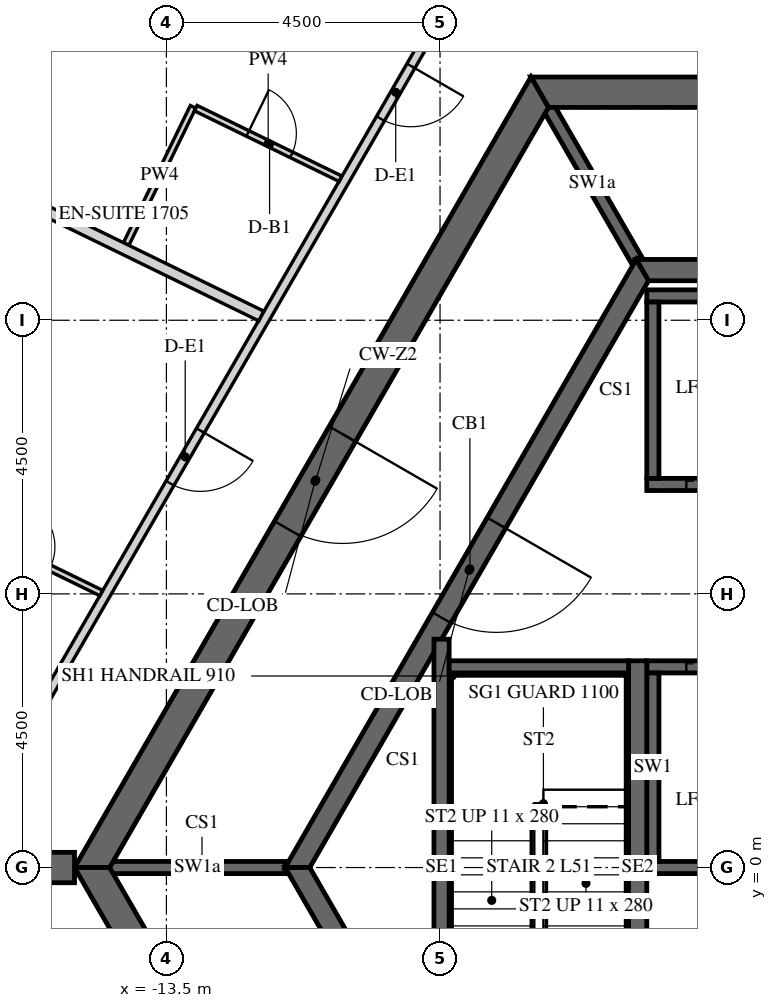
"""IFC4 building model, lengths in metres.
Left out: names, types, materials, properties, quantities, classifications, styles, units other than length and angle.
Written with IfcOpenShell. Run it as: python <this file> out.ifc"""

import sys

from ifc_helpers import new_model, si_unit, direction, frame, frame_2d, origin, place, context, subcontext, project, spatial, polyline, rectangle, outline, extrude, element, fill, save


model = new_model("IFC4")
c1 = context("Model", 3, precision=1e-05, world=origin(), true_north=direction((0.0, 1.0)))
c2 = subcontext(c1, "Body", "Model", "MODEL_VIEW")
j1 = project(units=[si_unit("LENGTHUNIT", "METRE"), si_unit("PLANEANGLEUNIT", "RADIAN")], contexts=[c1])
p1 = place(None, origin())
s1 = spatial("IfcSite", under=j1, at=p1, CompositionType="ELEMENT")
p2 = place(p1, origin())
s2 = spatial("IfcBuilding", under=s1, at=p2, CompositionType="ELEMENT")
p3 = place(p2, frame((0.0, 0.0, 215.1)))
s3 = spatial("IfcBuildingStorey", under=s2, at=p3, CompositionType="ELEMENT", Elevation=215.1)
p4 = place(p3, frame((-7.361, 12.75, -0.15), z_axis=(0.0, 0.0, 1.0), x_axis=(-0.50000571537, -0.866022103989, 0.0)))
e1 = element("IfcWall", 1, at=p4, inside=s3, PredefinedType="SHEAR", context=c2, shape_type="SweptSolid", body=[
    extrude(outline(polyline([(-0.144, -0.25), (14.867, -0.25), (14.578, 0.25), (0.144, 0.25), (-0.144, -0.25)])), origin(), (0.0, 0.0, 1.0), 3.9),
])
p5 = place(p4, frame((6.49, 0.0, 0.15)))
e2 = element("IfcOpeningElement", 2, at=p5, cuts=e1, PredefinedType="OPENING", context=c2, shape_type="SweptSolid", body=[
    extrude(rectangle(XDim=1.8, YDim=2.4, at=frame_2d((0.9, 1.2))), frame((0.0, 0.26, 0.0), z_axis=(0.0, -1.0, 0.0), x_axis=(1.0, 0.0, 0.0)), (0.0, 0.0, 1.0), 0.52),
])
p6 = place(p3, frame((-14.722, 0.0, -0.15), z_axis=(0.0, 0.0, 1.0), x_axis=(0.50000571537, -0.866022103989, 0.0)))
e3 = element("IfcWall", 3, at=p6, inside=s3, PredefinedType="SHEAR", context=c2, shape_type="SweptSolid", body=[
    extrude(outline(polyline([(-0.144, -0.25), (14.867, -0.25), (14.578, 0.25), (0.144, 0.25), (-0.144, -0.25)])), origin(), (0.0, 0.0, 1.0), 3.9),
])
p7 = place(p6, frame((6.432, 0.0, 0.15)))
e4 = element("IfcOpeningElement", 4, at=p7, cuts=e3, PredefinedType="OPENING", context=c2, shape_type="SweptSolid", body=[
    extrude(rectangle(XDim=1.8, YDim=2.4, at=frame_2d((0.9, 1.2))), frame((0.0, 0.26, 0.0), z_axis=(0.0, -1.0, 0.0), x_axis=(1.0, 0.0, 0.0)), (0.0, 0.0, 1.0), 0.52),
])
p8 = place(p3, frame((7.361, 12.75, -0.15), z_axis=(0.0, 0.0, 1.0), x_axis=(-1.0, 0.0, 0.0)))
e5 = element("IfcWall", 5, at=p8, inside=s3, PredefinedType="SHEAR", context=c2, shape_type="SweptSolid", body=[
    extrude(outline(polyline([(-0.144, -0.25), (14.866, -0.25), (14.578, 0.25), (0.144, 0.25), (-0.144, -0.25)])), origin(), (0.0, 0.0, 1.0), 3.9),
])
p9 = place(p8, frame((6.761, 0.0, 0.15)))
e6 = element("IfcOpeningElement", 6, at=p9, cuts=e5, PredefinedType="OPENING", context=c2, shape_type="SweptSolid", body=[
    extrude(rectangle(XDim=1.2, YDim=2.4, at=frame_2d((0.6, 1.2))), frame((0.0, 0.26, 0.0), z_axis=(0.0, -1.0, 0.0), x_axis=(1.0, 0.0, 0.0)), (0.0, 0.0, 1.0), 0.52),
])
p10 = place(p3, frame((-15.011, 0.0, -0.15), z_axis=(0.0, 0.0, 1.0), x_axis=(-1.0, 0.0, 0.0)))
e7 = element("IfcWall", 7, at=p10, inside=s3, PredefinedType="SHEAR", context=c2, shape_type="SweptSolid", body=[
    extrude(rectangle(XDim=15.424, YDim=0.5, at=frame_2d((7.712, 0.0))), origin(), (0.0, 0.0, 1.0), 3.9),
])
p11 = place(p10, frame((6.812, 0.0, 0.15)))
e8 = element("IfcOpeningElement", 8, at=p11, cuts=e7, PredefinedType="OPENING", context=c2, shape_type="SweptSolid", body=[
    extrude(rectangle(XDim=1.8, YDim=2.4, at=frame_2d((0.9, 1.2))), frame((0.0, 0.26, 0.0), z_axis=(0.0, -1.0, 0.0), x_axis=(1.0, 0.0, 0.0)), (0.0, 0.0, 1.0), 0.52),
])
p12 = place(p3, frame((-5.673, 9.825, -0.15), z_axis=(0.0, 0.0, 1.0), x_axis=(-0.499995046907, -0.866028263435, 0.0)))
e9 = element("IfcWall", 9, at=p12, inside=s3, PredefinedType="SHEAR", context=c2, shape_type="SweptSolid", body=[
    extrude(outline(polyline([(-0.101, -0.175), (11.446, -0.175), (11.244, 0.175), (0.101, 0.175), (-0.101, -0.175)])), origin(), (0.0, 0.0, 1.0), 3.9),
])
p13 = place(p12, frame((4.801, 0.0, 0.15)))
e10 = element("IfcOpeningElement", 10, at=p13, cuts=e9, PredefinedType="OPENING", context=c2, shape_type="SweptSolid", body=[
    extrude(rectangle(XDim=1.8, YDim=2.4, at=frame_2d((0.9, 1.2))), frame((0.0, 0.185, 0.0), z_axis=(0.0, -1.0, 0.0), x_axis=(1.0, 0.0, 0.0)), (0.0, 0.0, 1.0), 0.37),
])
p14 = place(p3, frame((-11.345, 0.0, -0.15), z_axis=(0.0, 0.0, 1.0), x_axis=(0.499995046907, -0.866028263435, 0.0)))
e11 = element("IfcWall", 11, at=p14, inside=s3, PredefinedType="SHEAR", context=c2, shape_type="SweptSolid", body=[
    extrude(outline(polyline([(-0.101, -0.175), (11.446, -0.175), (11.244, 0.175), (0.101, 0.175), (-0.101, -0.175)])), origin(), (0.0, 0.0, 1.0), 3.9),
])
p15 = place(p14, frame((4.744, 0.0, 0.15)))
e12 = element("IfcOpeningElement", 12, at=p15, cuts=e11, PredefinedType="OPENING", context=c2, shape_type="SweptSolid", body=[
    extrude(rectangle(XDim=1.8, YDim=2.4, at=frame_2d((0.9, 1.2))), frame((0.0, 0.185, 0.0), z_axis=(0.0, -1.0, 0.0), x_axis=(1.0, 0.0, 0.0)), (0.0, 0.0, 1.0), 0.37),
])
p16 = place(p3, frame((5.673, 9.825, -0.15), z_axis=(0.0, 0.0, 1.0), x_axis=(-1.0, 0.0, 0.0)))
e13 = element("IfcWall", 13, at=p16, inside=s3, PredefinedType="SHEAR", context=c2, shape_type="SweptSolid", body=[
    extrude(outline(polyline([(-0.101, -0.175), (11.446, -0.175), (11.244, 0.175), (0.101, 0.175), (-0.101, -0.175)])), origin(), (0.0, 0.0, 1.0), 3.9),
])
p17 = place(p3, frame((-5.6, 6.3, -0.25), z_axis=(0.0, 0.0, 1.0), x_axis=(1.0, 0.0, 0.0)))
e14 = element("IfcWall", 14, at=p17, inside=s3, PredefinedType="SHEAR", context=c2, shape_type="SweptSolid", body=[
    extrude(rectangle(XDim=11.2, YDim=0.2, at=frame_2d((5.6, 0.0))), origin(), (0.0, 0.0, 1.0), 3.9),
])
p18 = place(p17, frame((8.45, 0.0, 0.25)))
e15 = element("IfcOpeningElement", 15, at=p18, cuts=e14, PredefinedType="OPENING", context=c2, shape_type="SweptSolid", body=[
    extrude(rectangle(XDim=0.9, YDim=2.1, at=frame_2d((0.45, 1.05))), frame((0.0, 0.11, 0.0), z_axis=(0.0, -1.0, 0.0), x_axis=(1.0, 0.0, 0.0)), (0.0, 0.0, 1.0), 0.22),
])
p19 = place(p17, frame((0.65, 0.0, 0.25)))
e16 = element("IfcOpeningElement", 16, at=p19, cuts=e14, PredefinedType="OPENING", context=c2, shape_type="SweptSolid", body=[
    extrude(rectangle(XDim=1.1, YDim=2.1, at=frame_2d((0.55, 1.05))), frame((0.0, 0.11, 0.0), z_axis=(0.0, -1.0, 0.0), x_axis=(1.0, 0.0, 0.0)), (0.0, 0.0, 1.0), 0.22),
])
p20 = place(p17, frame((2.85, 0.0, 0.25)))
e17 = element("IfcOpeningElement", 17, at=p20, cuts=e14, PredefinedType="OPENING", context=c2, shape_type="SweptSolid", body=[
    extrude(rectangle(XDim=1.1, YDim=2.1, at=frame_2d((0.55, 1.05))), frame((0.0, 0.11, 0.0), z_axis=(0.0, -1.0, 0.0), x_axis=(1.0, 0.0, 0.0)), (0.0, 0.0, 1.0), 0.22),
])
p21 = place(p17, frame((5.05, 0.0, 0.25)))
e18 = element("IfcOpeningElement", 18, at=p21, cuts=e14, PredefinedType="OPENING", context=c2, shape_type="SweptSolid", body=[
    extrude(rectangle(XDim=1.1, YDim=2.1, at=frame_2d((0.55, 1.05))), frame((0.0, 0.11, 0.0), z_axis=(0.0, -1.0, 0.0), x_axis=(1.0, 0.0, 0.0)), (0.0, 0.0, 1.0), 0.22),
])
p22 = place(p3, frame((-5.6, 9.4, -0.25), z_axis=(0.0, 0.0, 1.0), x_axis=(1.0, 0.0, 0.0)))
e19 = element("IfcWall", 19, at=p22, inside=s3, PredefinedType="SHEAR", context=c2, shape_type="SweptSolid", body=[
    extrude(rectangle(XDim=11.2, YDim=0.2, at=frame_2d((5.6, 0.0))), origin(), (0.0, 0.0, 1.0), 3.9),
])
p23 = place(p3, frame((-5.5, 6.4, -0.25), z_axis=(0.0, 0.0, 1.0), x_axis=(0.0, 1.0, 0.0)))
e20 = element("IfcWall", 20, at=p23, inside=s3, PredefinedType="SHEAR", context=c2, shape_type="SweptSolid", body=[
    extrude(rectangle(XDim=2.9, YDim=0.2, at=frame_2d((1.45, 0.0))), origin(), (0.0, 0.0, 1.0), 3.9),
])
p24 = place(p3, frame((-5.6, 3.3, -0.25), z_axis=(0.0, 0.0, 1.0), x_axis=(1.0, 0.0, 0.0)))
e21 = element("IfcWall", 21, at=p24, inside=s3, PredefinedType="SHEAR", context=c2, shape_type="SweptSolid", body=[
    extrude(rectangle(XDim=11.2, YDim=0.2, at=frame_2d((5.6, 0.0))), origin(), (0.0, 0.0, 1.0), 3.9),
])
p25 = place(p24, frame((0.65, 0.0, 0.25)))
e22 = element("IfcOpeningElement", 22, at=p25, cuts=e21, PredefinedType="OPENING", context=c2, shape_type="SweptSolid", body=[
    extrude(rectangle(XDim=1.1, YDim=2.1, at=frame_2d((0.55, 1.05))), frame((0.0, 0.11, 0.0), z_axis=(0.0, -1.0, 0.0), x_axis=(1.0, 0.0, 0.0)), (0.0, 0.0, 1.0), 0.22),
])
p26 = place(p24, frame((2.85, 0.0, 0.25)))
e23 = element("IfcOpeningElement", 23, at=p26, cuts=e21, PredefinedType="OPENING", context=c2, shape_type="SweptSolid", body=[
    extrude(rectangle(XDim=1.1, YDim=2.1, at=frame_2d((0.55, 1.05))), frame((0.0, 0.11, 0.0), z_axis=(0.0, -1.0, 0.0), x_axis=(1.0, 0.0, 0.0)), (0.0, 0.0, 1.0), 0.22),
])
p27 = place(p24, frame((5.05, 0.0, 0.25)))
e24 = element("IfcOpeningElement", 24, at=p27, cuts=e21, PredefinedType="OPENING", context=c2, shape_type="SweptSolid", body=[
    extrude(rectangle(XDim=1.1, YDim=2.1, at=frame_2d((0.55, 1.05))), frame((0.0, 0.11, 0.0), z_axis=(0.0, -1.0, 0.0), x_axis=(1.0, 0.0, 0.0)), (0.0, 0.0, 1.0), 0.22),
])
p28 = place(p24, frame((7.25, 0.0, 0.25)))
e25 = element("IfcOpeningElement", 25, at=p28, cuts=e21, PredefinedType="OPENING", context=c2, shape_type="SweptSolid", body=[
    extrude(rectangle(XDim=1.1, YDim=2.1, at=frame_2d((0.55, 1.05))), frame((0.0, 0.11, 0.0), z_axis=(0.0, -1.0, 0.0), x_axis=(1.0, 0.0, 0.0)), (0.0, 0.0, 1.0), 0.22),
])
p29 = place(p24, frame((9.45, 0.0, 0.25)))
e26 = element("IfcOpeningElement", 26, at=p29, cuts=e21, PredefinedType="OPENING", context=c2, shape_type="SweptSolid", body=[
    extrude(rectangle(XDim=1.1, YDim=2.1, at=frame_2d((0.55, 1.05))), frame((0.0, 0.11, 0.0), z_axis=(0.0, -1.0, 0.0), x_axis=(1.0, 0.0, 0.0)), (0.0, 0.0, 1.0), 0.22),
])
p30 = place(p3, frame((-5.6, 0.0, -0.25), z_axis=(0.0, 0.0, 1.0), x_axis=(1.0, 0.0, 0.0)))
e27 = element("IfcWall", 27, at=p30, inside=s3, PredefinedType="SHEAR", context=c2, shape_type="SweptSolid", body=[
    extrude(rectangle(XDim=11.2, YDim=0.2, at=frame_2d((5.6, 0.0))), origin(), (0.0, 0.0, 1.0), 3.9),
])
p31 = place(p3, frame((-5.5, 0.1, -0.25), z_axis=(0.0, 0.0, 1.0), x_axis=(0.0, 1.0, 0.0)))
e28 = element("IfcWall", 28, at=p31, inside=s3, PredefinedType="SHEAR", context=c2, shape_type="SweptSolid", body=[
    extrude(rectangle(XDim=3.1, YDim=0.2, at=frame_2d((1.55, 0.0))), origin(), (0.0, 0.0, 1.0), 3.9),
])
for number, where, z_axis, x_axis in (
    (29, (-5.773, 10.0, -0.15), (0.0, 0.0, 1.0), (-0.5, 0.866, 0.0)),
    (30, (-11.547, 0.0, -0.15), (0.0, 0.0, 1.0), (-1.0, 0.0, 0.0)),
):
    element("IfcWall", number, at=place(p3, frame(where, z_axis=z_axis, x_axis=x_axis)), inside=s3, PredefinedType="SHEAR", context=c2, shape_type="SweptSolid", body=[
        extrude(rectangle(XDim=2.887, YDim=0.2, at=frame_2d((1.443, 0.0))), origin(), (0.0, 0.0, 1.0), 3.9),
    ])
p32 = place(p3, frame((-5.75, -3.4, -0.25), z_axis=(0.0, 0.0, 1.0), x_axis=(0.0, 1.0, 0.0)))
e31 = element("IfcWall", 31, at=p32, inside=s3, PredefinedType="SHEAR", context=c2, shape_type="SweptSolid", body=[
    extrude(rectangle(XDim=6.8, YDim=0.3, at=frame_2d((3.4, 0.0))), origin(), (0.0, 0.0, 1.0), 3.9),
])
p33 = place(p3, frame((-8.975, -3.755, -0.25), z_axis=(0.0, 0.0, 1.0), x_axis=(0.0, 1.0, 0.0)))
e32 = element("IfcWall", 32, at=p33, inside=s3, PredefinedType="SHEAR", context=c2, shape_type="SweptSolid", body=[
    extrude(rectangle(XDim=7.51, YDim=0.25, at=frame_2d((3.755, 0.0))), origin(), (0.0, 0.0, 1.0), 3.9),
])
p34 = place(p3, frame((-8.85, 3.3, -0.25), z_axis=(0.0, 0.0, 1.0), x_axis=(1.0, 0.0, 0.0)))
e33 = element("IfcWall", 33, at=p34, inside=s3, PredefinedType="SHEAR", context=c2, shape_type="SweptSolid", body=[
    extrude(rectangle(XDim=2.95, YDim=0.2, at=frame_2d((1.475, 0.0))), origin(), (0.0, 0.0, 1.0), 3.9),
])
p35 = place(p3, frame((-8.588, 14.725, 0.0), z_axis=(0.0, 0.0, 1.0), x_axis=(-0.499999403554, -0.866025748143, 0.0)))
e34 = element("IfcWall", 34, at=p35, inside=s3, PredefinedType="PARTITIONING", context=c2, shape_type="SweptSolid", body=[
    extrude(rectangle(XDim=14.549, YDim=0.15, at=frame_2d((7.275, 0.0))), origin(), (0.0, 0.0, 1.0), 2.988),
])
p36 = place(p35, frame((1.781, 0.0, 0.0)))
e35 = element("IfcOpeningElement", 35, at=p36, cuts=e34, PredefinedType="OPENING", context=c2, shape_type="SweptSolid", body=[
    extrude(rectangle(XDim=1.0, YDim=2.1, at=frame_2d((0.5, 1.05))), frame((0.0, 0.085, 0.0), z_axis=(0.0, -1.0, 0.0), x_axis=(1.0, 0.0, 0.0)), (0.0, 0.0, 1.0), 0.17),
])
p37 = place(p35, frame((8.705, 0.0, 0.0)))
e36 = element("IfcOpeningElement", 36, at=p37, cuts=e34, PredefinedType="OPENING", context=c2, shape_type="SweptSolid", body=[
    extrude(rectangle(XDim=1.0, YDim=2.1, at=frame_2d((0.5, 1.05))), frame((0.0, 0.085, 0.0), z_axis=(0.0, -1.0, 0.0), x_axis=(1.0, 0.0, 0.0)), (0.0, 0.0, 1.0), 0.17),
])
p38 = place(p3, frame((-14.162, 10.254, 0.0), z_axis=(0.0, 0.0, 1.0), x_axis=(0.438398718232, 0.898780598284, 0.0)))
e37 = element("IfcWall", 37, at=p38, inside=s3, PredefinedType="PARTITIONING", context=c2, shape_type="SweptSolid", body=[
    extrude(rectangle(XDim=2.51, YDim=0.1, at=frame_2d((1.255, 0.0))), origin(), (0.0, 0.0, 1.0), 2.988),
])
p39 = place(p3, frame((-13.017, 12.488, 0.0), z_axis=(0.0, 0.0, 1.0), x_axis=(0.89882691906, -0.438303741226, 0.0)))
e38 = element("IfcWall", 38, at=p39, inside=s3, PredefinedType="PARTITIONING", context=c2, shape_type="SweptSolid", body=[
    extrude(rectangle(XDim=2.648, YDim=0.1, at=frame_2d((1.324, 0.0))), origin(), (0.0, 0.0, 1.0), 2.988),
])
p40 = place(p39, frame((0.95, 0.0, 0.0)))
e39 = element("IfcOpeningElement", 39, at=p40, cuts=e38, PredefinedType="OPENING", context=c2, shape_type="SweptSolid", body=[
    extrude(rectangle(XDim=0.8, YDim=2.1, at=frame_2d((0.4, 1.05))), frame((0.0, 0.06, 0.0), z_axis=(0.0, -1.0, 0.0), x_axis=(1.0, 0.0, 0.0)), (0.0, 0.0, 1.0), 0.12),
])
p41 = place(p3, frame((-23.393, 14.656, 0.0), z_axis=(0.0, 0.0, 1.0), x_axis=(0.898790356386, -0.438378712152, 0.0)))
e40 = element("IfcWall", 40, at=p41, inside=s3, PredefinedType="PARTITIONING", context=c2, shape_type="SweptSolid", body=[
    extrude(rectangle(XDim=12.743, YDim=0.18, at=frame_2d((6.372, 0.0))), origin(), (0.0, 0.0, 1.0), 2.988),
])
p42 = place(p3, frame((-17.077, 5.737, 0.0), z_axis=(0.0, 0.0, 1.0), x_axis=(0.898777698277, -0.438404663616, 0.0)))
e41 = element("IfcWall", 41, at=p42, inside=s3, PredefinedType="PARTITIONING", context=c2, shape_type="SweptSolid", body=[
    extrude(rectangle(XDim=2.79, YDim=0.1, at=frame_2d((1.395, 0.0))), origin(), (0.0, 0.0, 1.0), 2.988),
])
p43 = place(p42, frame((1.05, 0.0, 0.0)))
e42 = element("IfcOpeningElement", 42, at=p43, cuts=e41, PredefinedType="OPENING", context=c2, shape_type="SweptSolid", body=[
    extrude(rectangle(XDim=0.8, YDim=2.1, at=frame_2d((0.4, 1.05))), frame((0.0, 0.06, 0.0), z_axis=(0.0, -1.0, 0.0), x_axis=(1.0, 0.0, 0.0)), (0.0, 0.0, 1.0), 0.12),
])
p44 = place(p5, origin())
e43 = element("IfcDoor", 43, at=p44, inside=s3, OperationType="DOUBLE_DOOR_SINGLE_SWING", PredefinedType="DOOR", context=c2, shape_type="SweptSolid", body=[
    extrude(rectangle(XDim=1.8, YDim=2.4, at=frame_2d((0.9, 1.2))), frame((0.0, 0.025, 0.0), z_axis=(0.0, -1.0, 0.0), x_axis=(1.0, 0.0, 0.0)), (0.0, 0.0, 1.0), 0.05),
])
fill(e2, e43)
p45 = place(p13, origin())
e44 = element("IfcDoor", 44, at=p45, inside=s3, OperationType="DOUBLE_DOOR_SINGLE_SWING", PredefinedType="DOOR", context=c2, shape_type="SweptSolid", body=[
    extrude(rectangle(XDim=1.8, YDim=2.4, at=frame_2d((0.9, 1.2))), frame((0.0, 0.025, 0.0), z_axis=(0.0, -1.0, 0.0), x_axis=(1.0, 0.0, 0.0)), (0.0, 0.0, 1.0), 0.05),
])
fill(e10, e44)
p46 = place(p19, origin())
e45 = element("IfcDoor", 45, at=p46, inside=s3, OperationType="SLIDING_TO_LEFT", PredefinedType="DOOR", context=c2, shape_type="SweptSolid", body=[
    extrude(rectangle(XDim=1.1, YDim=2.1, at=frame_2d((0.55, 1.05))), frame((0.0, 0.025, 0.0), z_axis=(0.0, -1.0, 0.0), x_axis=(1.0, 0.0, 0.0)), (0.0, 0.0, 1.0), 0.05),
])
fill(e16, e45)
p47 = place(p25, origin())
e46 = element("IfcDoor", 46, at=p47, inside=s3, OperationType="SLIDING_TO_LEFT", PredefinedType="DOOR", context=c2, shape_type="SweptSolid", body=[
    extrude(rectangle(XDim=1.1, YDim=2.1, at=frame_2d((0.55, 1.05))), frame((0.0, 0.025, 0.0), z_axis=(0.0, -1.0, 0.0), x_axis=(1.0, 0.0, 0.0)), (0.0, 0.0, 1.0), 0.05),
])
fill(e22, e46)
p48 = place(p36, origin())
e47 = element("IfcDoor", 47, at=p48, inside=s3, OperationType="SINGLE_SWING_LEFT", PredefinedType="DOOR", context=c2, shape_type="SweptSolid", body=[
    extrude(rectangle(XDim=1.0, YDim=2.1, at=frame_2d((0.5, 1.05))), frame((0.0, 0.025, 0.0), z_axis=(0.0, -1.0, 0.0), x_axis=(1.0, 0.0, 0.0)), (0.0, 0.0, 1.0), 0.05),
])
fill(e35, e47)
p49 = place(p40, origin())
e48 = element("IfcDoor", 48, at=p49, inside=s3, OperationType="SINGLE_SWING_LEFT", PredefinedType="DOOR", context=c2, shape_type="SweptSolid", body=[
    extrude(rectangle(XDim=0.8, YDim=2.1, at=frame_2d((0.4, 1.05))), frame((0.0, 0.025, 0.0), z_axis=(0.0, -1.0, 0.0), x_axis=(1.0, 0.0, 0.0)), (0.0, 0.0, 1.0), 0.05),
])
fill(e39, e48)
p50 = place(p37, origin())
e49 = element("IfcDoor", 49, at=p50, inside=s3, OperationType="SINGLE_SWING_RIGHT", PredefinedType="DOOR", context=c2, shape_type="SweptSolid", body=[
    extrude(rectangle(XDim=1.0, YDim=2.1, at=frame_2d((0.5, 1.05))), frame((0.0, 0.025, 0.0), z_axis=(0.0, -1.0, 0.0), x_axis=(1.0, 0.0, 0.0)), (0.0, 0.0, 1.0), 0.05),
])
fill(e36, e49)
save(model, sys.argv[1])
